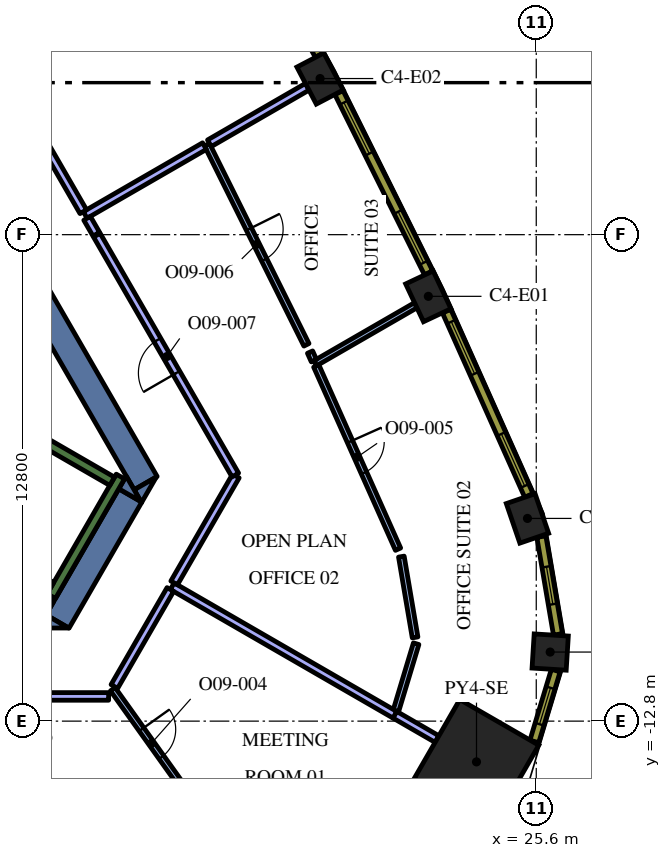
"""IFC4 building model, lengths in metres.
Left out: names, types, materials, properties, quantities, classifications, styles, units other than length and angle.
Written with IfcOpenShell. Run it as: python <this file> out.ifc"""

import sys

from ifc_helpers import new_model, si_unit, direction, frame, frame_2d, origin, origin_2d, place, context, subcontext, project, spatial, polyline, rectangle, outline, extrude, element, fill, save


model = new_model("IFC4")
c1 = context("Model", 3, precision=1e-05, world=origin(), true_north=direction((0.0, 1.0)))
c2 = subcontext(c1, "Body", "Model", "MODEL_VIEW")
j1 = project(units=[si_unit("LENGTHUNIT", "METRE"), si_unit("PLANEANGLEUNIT", "RADIAN")], contexts=[c1])
p1 = place(None, origin())
s1 = spatial("IfcSite", under=j1, at=p1, CompositionType="ELEMENT")
p2 = place(p1, origin())
s2 = spatial("IfcBuilding", under=s1, at=p2, CompositionType="ELEMENT")
p3 = place(p2, frame((0.0, 0.0, 243.6)))
s3 = spatial("IfcBuildingStorey", under=s2, at=p3, CompositionType="ELEMENT", Elevation=243.6)
p4 = place(p3, frame((24.027, -13.872, 0.0), z_axis=(0.0, 0.0, 1.0), x_axis=(0.866025403784, -0.5, 0.0)))
e1 = element("IfcColumn", 1, at=p4, inside=s3, PredefinedType="COLUMN", context=c2, shape_type="SweptSolid", body=[
    extrude(rectangle(XDim=2.4, YDim=2.4, at=origin_2d()), origin(), (0.0, 0.0, 1.0), 4.2),
])
p5 = place(p3, frame((25.967, -10.982, 0.0), z_axis=(0.0, 0.0, 1.0), x_axis=(0.062217428964, 0.998062619044, 0.0)))
e2 = element("IfcColumn", 2, at=p5, inside=s3, PredefinedType="COLUMN", context=c2, shape_type="SweptSolid", body=[
    extrude(rectangle(XDim=0.9, YDim=0.9, at=origin_2d()), origin(), (0.0, 0.0, 1.0), 4.2),
])
for number, where, z_axis, x_axis in (
    (3, (25.369, -7.466, 0.0), (0.0, 0.0, 1.0), (-0.324, 0.946, 0.0)),
    (4, (22.76, -1.623, 0.0), (0.0, 0.0, 1.0), (-0.426, 0.905, 0.0)),
    (5, (19.912, 4.108, 0.0), (0.0, 0.0, 1.0), (-0.464, 0.886, 0.0)),
):
    element("IfcColumn", number, at=place(p3, frame(where, z_axis=z_axis, x_axis=x_axis)), inside=s3, PredefinedType="COLUMN", context=c2, shape_type="SweptSolid", body=[
        extrude(rectangle(XDim=1.1, YDim=0.8, at=origin_2d()), origin(), (0.0, 0.0, 1.0), 4.2),
    ])
p6 = place(p3, frame((9.085, 4.264, 0.0), z_axis=(0.0, 0.0, 1.0), x_axis=(0.499998082512, -0.866026510844, 0.0)))
e6 = element("IfcWall", 6, at=p6, inside=s3, PredefinedType="SOLIDWALL", context=c2, shape_type="SweptSolid", body=[
    extrude(rectangle(XDim=12.472, YDim=0.7, at=frame_2d((6.236, 0.0))), origin(), (0.0, 0.0, 1.0), 4.2),
])
p7 = place(p3, origin())
e7 = element("IfcWall", 7, at=p7, inside=s3, PredefinedType="SOLIDWALL", context=c2, shape_type="SweptSolid", body=[
    extrude(outline(polyline([(15.213, -7.05), (15.019, -6.714), (15.601, -6.378), (15.213, -7.05)])), origin(), (0.0, 0.0, 1.0), 4.2),
])
p8 = place(p3, frame((13.003, -10.179, 0.0), z_axis=(0.0, 0.0, 1.0), x_axis=(0.499972675833, 0.866041178825, 0.0)))
e8 = element("IfcWall", 8, at=p8, inside=s3, PredefinedType="SOLIDWALL", context=c2, shape_type="SweptSolid", body=[
    extrude(rectangle(XDim=3.829, YDim=0.7, at=frame_2d((1.915, 0.0))), origin(), (0.0, 0.0, 1.0), 4.2),
])
e9 = element("IfcWall", 9, at=p7, inside=s3, PredefinedType="SOLIDWALL", context=c2, shape_type="SweptSolid", body=[
    extrude(outline(polyline([(12.5, -10.35), (12.698, -10.005), (13.296, -10.35), (12.5, -10.35)])), origin(), (0.0, 0.0, 1.0), 4.2),
])
e10 = element("IfcWall", 10, at=p7, inside=s3, PredefinedType="SOLIDWALL", context=c2, shape_type="SweptSolid", body=[
    extrude(outline(polyline([(14.809, -6.35), (15.197, -7.022), (14.615, -6.686), (14.809, -6.35)])), origin(), (0.0, 0.0, 1.0), 4.2),
])
e11 = element("IfcWall", 11, at=p7, inside=s3, PredefinedType="SOLIDWALL", context=c2, shape_type="SweptSolid", body=[
    extrude(outline(polyline([(12.904, -9.65), (12.516, -10.322), (12.516, -9.65), (12.904, -9.65)])), origin(), (0.0, 0.0, 1.0), 4.2),
])
p9 = place(p3, frame((12.84, -9.511, 0.0), z_axis=(0.0, 0.0, 1.0), x_axis=(0.500048121057, 0.865997619297, 0.0)))
e12 = element("IfcWall", 12, at=p9, inside=s3, PredefinedType="SOLIDWALL", context=c2, shape_type="SweptSolid", body=[
    extrude(rectangle(XDim=3.634, YDim=0.25, at=frame_2d((1.817, 0.0))), origin(), (0.0, 0.0, 1.0), 4.2),
])
p10 = place(p3, frame((12.84, -9.261, 0.0), z_axis=(0.0, 0.0, 1.0), x_axis=(-0.866013990052, 0.500019768644, 0.0)))
e13 = element("IfcWall", 13, at=p10, inside=s3, PredefinedType="SOLIDWALL", context=c2, shape_type="SweptSolid", body=[
    extrude(rectangle(XDim=6.8, YDim=0.25, at=frame_2d((3.4, 0.0))), origin(), (0.0, 0.0, 1.0), 4.2),
])
p11 = place(p3, frame((8.334, -2.964, 0.0), z_axis=(0.0, 0.0, 1.0), x_axis=(0.866016039709, -0.500016218704, 0.0)))
e14 = element("IfcWall", 14, at=p11, inside=s3, PredefinedType="SOLIDWALL", context=c2, shape_type="SweptSolid", body=[
    extrude(rectangle(XDim=7.05, YDim=0.25, at=frame_2d((3.525, 0.0))), origin(), (0.0, 0.0, 1.0), 4.2),
])
p12 = place(p3, frame((14.457, -11.96, 0.0), z_axis=(0.0, 0.0, 1.0), x_axis=(0.581049944662, -0.81386790194, 0.0)))
e15 = element("IfcWall", 15, at=p12, inside=s3, PredefinedType="PARTITIONING", context=c2, shape_type="SweptSolid", body=[
    extrude(rectangle(XDim=3.926, YDim=0.15, at=frame_2d((1.963, 0.0))), origin(), (0.0, 0.0, 1.0), 3.45),
])
p13 = place(p12, frame((1.3, 0.0, 0.0)))
e16 = element("IfcOpeningElement", 16, at=p13, cuts=e15, PredefinedType="OPENING", context=c2, shape_type="SweptSolid", body=[
    extrude(rectangle(XDim=0.9, YDim=2.1, at=frame_2d((0.45, 1.05))), frame((0.0, 0.085, 0.0), z_axis=(0.0, -1.0, 0.0), x_axis=(1.0, 0.0, 0.0)), (0.0, 0.0, 1.0), 0.17),
])
p14 = place(p3, frame((9.72, -12.15, 0.0), z_axis=(0.0, 0.0, 1.0), x_axis=(1.0, 0.0, 0.0)))
e17 = element("IfcWall", 17, at=p14, inside=s3, PredefinedType="PARTITIONING", context=c2, shape_type="SweptSolid", body=[
    extrude(rectangle(XDim=4.627, YDim=0.2, at=frame_2d((2.314, 0.0))), origin(), (0.0, 0.0, 1.0), 3.45),
])
p15 = place(p14, frame((1.8, 0.0, 0.0)))
e18 = element("IfcOpeningElement", 18, at=p15, cuts=e17, PredefinedType="OPENING", context=c2, shape_type="SweptSolid", body=[
    extrude(rectangle(XDim=1.0, YDim=2.1, at=frame_2d((0.5, 1.05))), frame((0.0, 0.11, 0.0), z_axis=(0.0, -1.0, 0.0), x_axis=(1.0, 0.0, 0.0)), (0.0, 0.0, 1.0), 0.22),
])
p16 = place(p3, frame((21.873, -12.628, 0.0), z_axis=(0.0, 0.0, 1.0), x_axis=(0.866052988967, -0.499952218018, 0.0)))
e19 = element("IfcWall", 19, at=p16, inside=s3, PredefinedType="PARTITIONING", context=c2, shape_type="SweptSolid", body=[
    extrude(rectangle(XDim=1.288, YDim=0.2, at=frame_2d((0.644, 0.0))), origin(), (0.0, 0.0, 1.0), 3.45),
])
p17 = place(p3, frame((16.021, -9.25, 0.0), z_axis=(0.0, 0.0, 1.0), x_axis=(0.86602692059, -0.499997372806, 0.0)))
e20 = element("IfcWall", 20, at=p17, inside=s3, PredefinedType="PARTITIONING", context=c2, shape_type="SweptSolid", body=[
    extrude(rectangle(XDim=6.765, YDim=0.2, at=frame_2d((3.382, 0.0))), origin(), (0.0, 0.0, 1.0), 3.45),
])
p18 = place(p3, frame((14.498, -11.888, 0.0), z_axis=(0.0, 0.0, 1.0), x_axis=(0.500006981563, 0.86602137294, 0.0)))
e21 = element("IfcWall", 21, at=p18, inside=s3, PredefinedType="PARTITIONING", context=c2, shape_type="SweptSolid", body=[
    extrude(rectangle(XDim=2.946, YDim=0.2, at=frame_2d((1.473, 0.0))), origin(), (0.0, 0.0, 1.0), 3.45),
])
p19 = place(p3, frame((19.78, -3.386, 0.0), z_axis=(0.0, 0.0, 1.0), x_axis=(0.866063280451, 0.49993438995, 0.0)))
e22 = element("IfcWall", 22, at=p19, inside=s3, PredefinedType="PARTITIONING", context=c2, shape_type="SweptSolid", body=[
    extrude(rectangle(XDim=3.058, YDim=0.15, at=frame_2d((1.529, 0.0))), origin(), (0.0, 0.0, 1.0), 3.45),
])
p20 = place(p3, frame((21.906, -12.532, 0.0), z_axis=(0.0, 0.0, 1.0), x_axis=(0.288789848591, 0.957392512688, 0.0)))
e23 = element("IfcWall", 23, at=p20, inside=s3, PredefinedType="PARTITIONING", context=c2, shape_type="SweptSolid", body=[
    extrude(rectangle(XDim=1.848, YDim=0.15, at=frame_2d((0.924, 0.0))), origin(), (0.0, 0.0, 1.0), 3.45),
])
p21 = place(p3, frame((22.412, -10.597, 0.0), z_axis=(0.0, 0.0, 1.0), x_axis=(-0.167612004459, 0.985853039738, 0.0)))
e24 = element("IfcWall", 24, at=p21, inside=s3, PredefinedType="PARTITIONING", context=c2, shape_type="SweptSolid", body=[
    extrude(rectangle(XDim=2.156, YDim=0.15, at=frame_2d((1.078, 0.0))), origin(), (0.0, 0.0, 1.0), 3.45),
])
p22 = place(p3, frame((19.811, -3.455, 0.0), z_axis=(0.0, 0.0, 1.0), x_axis=(0.407605393886, -0.913158169692, 0.0)))
e25 = element("IfcWall", 25, at=p22, inside=s3, PredefinedType="PARTITIONING", context=c2, shape_type="SweptSolid", body=[
    extrude(rectangle(XDim=5.279, YDim=0.15, at=frame_2d((2.64, 0.0))), origin(), (0.0, 0.0, 1.0), 3.45),
])
p23 = place(p22, frame((2.179, 0.0, 0.0)))
e26 = element("IfcOpeningElement", 26, at=p23, cuts=e25, PredefinedType="OPENING", context=c2, shape_type="SweptSolid", body=[
    extrude(rectangle(XDim=0.9, YDim=2.1, at=frame_2d((0.45, 1.05))), frame((0.0, 0.085, 0.0), z_axis=(0.0, -1.0, 0.0), x_axis=(1.0, 0.0, 0.0)), (0.0, 0.0, 1.0), 0.17),
])
p24 = place(p3, frame((19.75, -3.317, 0.0), z_axis=(0.0, 0.0, 1.0), x_axis=(-0.406774979688, 0.913528388119, 0.0)))
e27 = element("IfcWall", 27, at=p24, inside=s3, PredefinedType="PARTITIONING", context=c2, shape_type="SweptSolid", body=[
    extrude(rectangle(XDim=0.249, YDim=0.15, at=frame_2d((0.125, 0.0))), origin(), (0.0, 0.0, 1.0), 3.45),
])
p25 = place(p3, frame((16.935, 2.368, 0.0), z_axis=(0.0, 0.0, 1.0), x_axis=(0.445153322039, -0.895454365045, 0.0)))
e28 = element("IfcWall", 28, at=p25, inside=s3, PredefinedType="PARTITIONING", context=c2, shape_type="SweptSolid", body=[
    extrude(rectangle(XDim=5.881, YDim=0.15, at=frame_2d((2.94, 0.0))), origin(), (0.0, 0.0, 1.0), 3.45),
])
p26 = place(p25, frame((2.481, 0.0, 0.0)))
e29 = element("IfcOpeningElement", 29, at=p26, cuts=e28, PredefinedType="OPENING", context=c2, shape_type="SweptSolid", body=[
    extrude(rectangle(XDim=0.9, YDim=2.1, at=frame_2d((0.45, 1.05))), frame((0.0, 0.085, 0.0), z_axis=(0.0, -1.0, 0.0), x_axis=(1.0, 0.0, 0.0)), (0.0, 0.0, 1.0), 0.17),
])
p27 = place(p3, frame((17.0, 2.406, 0.0), z_axis=(0.0, 0.0, 1.0), x_axis=(0.86605561342, 0.499947671726, 0.0)))
e30 = element("IfcWall", 30, at=p27, inside=s3, PredefinedType="PARTITIONING", context=c2, shape_type="SweptSolid", body=[
    extrude(rectangle(XDim=2.971, YDim=0.2, at=frame_2d((1.486, 0.0))), origin(), (0.0, 0.0, 1.0), 3.45),
])
p28 = place(p3, frame((13.731, 0.518, 0.0), z_axis=(0.0, 0.0, 1.0), x_axis=(0.8660128559, 0.500021732944, 0.0)))
e31 = element("IfcWall", 31, at=p28, inside=s3, PredefinedType="PARTITIONING", context=c2, shape_type="SweptSolid", body=[
    extrude(rectangle(XDim=3.625, YDim=0.2, at=frame_2d((1.812, 0.0))), origin(), (0.0, 0.0, 1.0), 3.45),
])
p29 = place(p3, frame((14.022, 0.013, 0.0), z_axis=(0.0, 0.0, 1.0), x_axis=(-0.500159754115, 0.865933150054, 0.0)))
e32 = element("IfcWall", 32, at=p29, inside=s3, PredefinedType="PARTITIONING", context=c2, shape_type="SweptSolid", body=[
    extrude(rectangle(XDim=0.483, YDim=0.2, at=frame_2d((0.242, 0.0))), origin(), (0.0, 0.0, 1.0), 3.45),
])
p30 = place(p3, frame((16.072, -9.163, 0.0), z_axis=(0.0, 0.0, 1.0), x_axis=(0.500010870188, 0.866019127788, 0.0)))
e33 = element("IfcWall", 33, at=p30, inside=s3, PredefinedType="PARTITIONING", context=c2, shape_type="SweptSolid", body=[
    extrude(rectangle(XDim=3.249, YDim=0.2, at=frame_2d((1.624, 0.0))), origin(), (0.0, 0.0, 1.0), 3.45),
])
p31 = place(p3, frame((17.681, -6.324, 0.0), z_axis=(0.0, 0.0, 1.0), x_axis=(-0.50002695829, 0.866009838849, 0.0)))
e34 = element("IfcWall", 34, at=p31, inside=s3, PredefinedType="PARTITIONING", context=c2, shape_type="SweptSolid", body=[
    extrude(rectangle(XDim=7.287, YDim=0.2, at=frame_2d((3.644, 0.0))), origin(), (0.0, 0.0, 1.0), 3.45),
])
p32 = place(p31, frame((3.1, 0.0, 0.0)))
e35 = element("IfcOpeningElement", 35, at=p32, cuts=e34, PredefinedType="OPENING", context=c2, shape_type="SweptSolid", body=[
    extrude(rectangle(XDim=1.0, YDim=2.1, at=frame_2d((0.5, 1.05))), frame((0.0, 0.11, 0.0), z_axis=(0.0, -1.0, 0.0), x_axis=(1.0, 0.0, 0.0)), (0.0, 0.0, 1.0), 0.22),
])
p33 = place(p3, frame((13.681, 0.604, 0.0), z_axis=(0.0, 0.0, 1.0), x_axis=(-0.500001759768, 0.86602438778, 0.0)))
e36 = element("IfcWall", 36, at=p33, inside=s3, PredefinedType="PARTITIONING", context=c2, shape_type="SweptSolid", body=[
    extrude(rectangle(XDim=13.317, YDim=0.2, at=frame_2d((6.658, 0.0))), origin(), (0.0, 0.0, 1.0), 3.45),
])
p34 = place(p33, frame((6.2, 0.0, 0.0)))
e37 = element("IfcOpeningElement", 37, at=p34, cuts=e36, PredefinedType="OPENING", context=c2, shape_type="SweptSolid", body=[
    extrude(rectangle(XDim=1.0, YDim=2.1, at=frame_2d((0.5, 1.05))), frame((0.0, 0.11, 0.0), z_axis=(0.0, -1.0, 0.0), x_axis=(1.0, 0.0, 0.0)), (0.0, 0.0, 1.0), 0.22),
])
p35 = place(p3, frame((25.55, -13.335, 0.0), z_axis=(0.0, 0.0, 1.0), x_axis=(0.288727209095, 0.957411405159, 0.0)))
e38 = element("IfcWall", 38, at=p35, inside=s3, PredefinedType="SOLIDWALL", context=c2, shape_type="SweptSolid", body=[
    extrude(rectangle(XDim=1.948, YDim=0.24, at=frame_2d((0.974, 0.0))), origin(), (0.0, 0.0, 1.0), 3.95),
])
p36 = place(p35, frame((0.474, 0.0, 0.9)))
e39 = element("IfcOpeningElement", 39, at=p36, cuts=e38, PredefinedType="OPENING", context=c2, shape_type="SweptSolid", body=[
    extrude(rectangle(XDim=1.0, YDim=2.55, at=frame_2d((0.5, 1.275))), frame((0.0, 0.13, 0.0), z_axis=(0.0, -1.0, 0.0), x_axis=(1.0, 0.0, 0.0)), (0.0, 0.0, 1.0), 0.26),
])
p37 = place(p3, frame((26.172, -10.517, 0.0), z_axis=(0.0, 0.0, 1.0), x_axis=(-0.167660055546, 0.985844869021, 0.0)))
e40 = element("IfcWall", 40, at=p37, inside=s3, PredefinedType="SOLIDWALL", context=c2, shape_type="SweptSolid", body=[
    extrude(rectangle(XDim=2.609, YDim=0.24, at=frame_2d((1.305, 0.0))), origin(), (0.0, 0.0, 1.0), 3.95),
])
p38 = place(p37, frame((0.805, 0.0, 0.9)))
e41 = element("IfcOpeningElement", 41, at=p38, cuts=e40, PredefinedType="OPENING", context=c2, shape_type="SweptSolid", body=[
    extrude(rectangle(XDim=1.0, YDim=2.55, at=frame_2d((0.5, 1.275))), frame((0.0, 0.13, 0.0), z_axis=(0.0, -1.0, 0.0), x_axis=(1.0, 0.0, 0.0)), (0.0, 0.0, 1.0), 0.26),
])
p39 = place(p3, frame((25.405, -6.861, 0.0), z_axis=(0.0, 0.0, 1.0), x_axis=(-0.407579651789, 0.913169659728, 0.0)))
e42 = element("IfcWall", 42, at=p39, inside=s3, PredefinedType="SOLIDWALL", context=c2, shape_type="SweptSolid", body=[
    extrude(rectangle(XDim=5.311, YDim=0.24, at=frame_2d((2.655, 0.0))), origin(), (0.0, 0.0, 1.0), 3.95),
])
p40 = place(p39, frame((0.271, 0.0, 0.9)))
e43 = element("IfcOpeningElement", 43, at=p40, cuts=e42, PredefinedType="OPENING", context=c2, shape_type="SweptSolid", body=[
    extrude(rectangle(XDim=1.5, YDim=2.55, at=frame_2d((0.75, 1.275))), frame((0.0, 0.13, 0.0), z_axis=(0.0, -1.0, 0.0), x_axis=(1.0, 0.0, 0.0)), (0.0, 0.0, 1.0), 0.26),
])
p41 = place(p39, frame((3.504, 0.0, 0.9)))
e44 = element("IfcOpeningElement", 44, at=p41, cuts=e42, PredefinedType="OPENING", context=c2, shape_type="SweptSolid", body=[
    extrude(rectangle(XDim=1.5, YDim=2.55, at=frame_2d((0.75, 1.275))), frame((0.0, 0.13, 0.0), z_axis=(0.0, -1.0, 0.0), x_axis=(1.0, 0.0, 0.0)), (0.0, 0.0, 1.0), 0.26),
])
p42 = place(p3, frame((22.766, -1.005, 0.0), z_axis=(0.0, 0.0, 1.0), x_axis=(-0.445129582031, 0.895466166419, 0.0)))
e45 = element("IfcWall", 45, at=p42, inside=s3, PredefinedType="SOLIDWALL", context=c2, shape_type="SweptSolid", body=[
    extrude(rectangle(XDim=5.298, YDim=0.24, at=frame_2d((2.649, 0.0))), origin(), (0.0, 0.0, 1.0), 3.95),
])
p43 = place(p42, frame((0.295, 0.0, 0.9)))
e46 = element("IfcOpeningElement", 46, at=p43, cuts=e45, PredefinedType="OPENING", context=c2, shape_type="SweptSolid", body=[
    extrude(rectangle(XDim=1.5, YDim=2.55, at=frame_2d((0.75, 1.275))), frame((0.0, 0.13, 0.0), z_axis=(0.0, -1.0, 0.0), x_axis=(1.0, 0.0, 0.0)), (0.0, 0.0, 1.0), 0.26),
])
p44 = place(p42, frame((3.504, 0.0, 0.9)))
e47 = element("IfcOpeningElement", 47, at=p44, cuts=e45, PredefinedType="OPENING", context=c2, shape_type="SweptSolid", body=[
    extrude(rectangle(XDim=1.5, YDim=2.55, at=frame_2d((0.75, 1.275))), frame((0.0, 0.13, 0.0), z_axis=(0.0, -1.0, 0.0), x_axis=(1.0, 0.0, 0.0)), (0.0, 0.0, 1.0), 0.26),
])
p45 = place(p3, frame((19.892, 4.725, 0.0), z_axis=(0.0, 0.0, 1.0), x_axis=(-0.481925825015, 0.876212017256, 0.0)))
e48 = element("IfcWall", 48, at=p45, inside=s3, PredefinedType="SOLIDWALL", context=c2, shape_type="SweptSolid", body=[
    extrude(rectangle(XDim=5.299, YDim=0.24, at=frame_2d((2.649, 0.0))), origin(), (0.0, 0.0, 1.0), 3.95),
])
p46 = place(p45, frame((0.295, 0.0, 0.9)))
e49 = element("IfcOpeningElement", 49, at=p46, cuts=e48, PredefinedType="OPENING", context=c2, shape_type="SweptSolid", body=[
    extrude(rectangle(XDim=1.5, YDim=2.55, at=frame_2d((0.75, 1.275))), frame((0.0, 0.13, 0.0), z_axis=(0.0, -1.0, 0.0), x_axis=(1.0, 0.0, 0.0)), (0.0, 0.0, 1.0), 0.26),
])
p47 = place(p45, frame((3.504, 0.0, 0.9)))
e50 = element("IfcOpeningElement", 50, at=p47, cuts=e48, PredefinedType="OPENING", context=c2, shape_type="SweptSolid", body=[
    extrude(rectangle(XDim=1.5, YDim=2.55, at=frame_2d((0.75, 1.275))), frame((0.0, 0.13, 0.0), z_axis=(0.0, -1.0, 0.0), x_axis=(1.0, 0.0, 0.0)), (0.0, 0.0, 1.0), 0.26),
])
p48 = place(p13, origin())
e51 = element("IfcDoor", 51, at=p48, inside=s3, OperationType="SINGLE_SWING_LEFT", PredefinedType="DOOR", context=c2, shape_type="SweptSolid", body=[
    extrude(rectangle(XDim=0.9, YDim=2.1, at=frame_2d((0.45, 1.05))), frame((0.0, 0.025, 0.0), z_axis=(0.0, -1.0, 0.0), x_axis=(1.0, 0.0, 0.0)), (0.0, 0.0, 1.0), 0.05),
])
fill(e16, e51)
p49 = place(p23, origin())
e52 = element("IfcDoor", 52, at=p49, inside=s3, OperationType="SINGLE_SWING_LEFT", PredefinedType="DOOR", context=c2, shape_type="SweptSolid", body=[
    extrude(rectangle(XDim=0.9, YDim=2.1, at=frame_2d((0.45, 1.05))), frame((0.0, 0.025, 0.0), z_axis=(0.0, -1.0, 0.0), x_axis=(1.0, 0.0, 0.0)), (0.0, 0.0, 1.0), 0.05),
])
fill(e26, e52)
p50 = place(p26, origin())
e53 = element("IfcDoor", 53, at=p50, inside=s3, OperationType="SINGLE_SWING_LEFT", PredefinedType="DOOR", context=c2, shape_type="SweptSolid", body=[
    extrude(rectangle(XDim=0.9, YDim=2.1, at=frame_2d((0.45, 1.05))), frame((0.0, 0.025, 0.0), z_axis=(0.0, -1.0, 0.0), x_axis=(1.0, 0.0, 0.0)), (0.0, 0.0, 1.0), 0.05),
])
fill(e29, e53)
p51 = place(p32, origin())
e54 = element("IfcDoor", 54, at=p51, inside=s3, OperationType="SINGLE_SWING_LEFT", PredefinedType="DOOR", context=c2, shape_type="SweptSolid", body=[
    extrude(rectangle(XDim=1.0, YDim=2.1, at=frame_2d((0.5, 1.05))), frame((0.0, 0.025, 0.0), z_axis=(0.0, -1.0, 0.0), x_axis=(1.0, 0.0, 0.0)), (0.0, 0.0, 1.0), 0.05),
])
fill(e35, e54)
p52 = place(p36, origin())
e55 = element("IfcWindow", 55, at=p52, inside=s3, PartitioningType="SINGLE_PANEL", PredefinedType="WINDOW", context=c2, shape_type="SweptSolid", body=[
    extrude(rectangle(XDim=1.0, YDim=2.55, at=frame_2d((0.5, 1.275))), frame((0.0, 0.04, 0.0), z_axis=(0.0, -1.0, 0.0), x_axis=(1.0, 0.0, 0.0)), (0.0, 0.0, 1.0), 0.06),
])
fill(e39, e55)
p53 = place(p38, origin())
e56 = element("IfcWindow", 56, at=p53, inside=s3, PartitioningType="SINGLE_PANEL", PredefinedType="WINDOW", context=c2, shape_type="SweptSolid", body=[
    extrude(rectangle(XDim=1.0, YDim=2.55, at=frame_2d((0.5, 1.275))), frame((0.0, 0.04, 0.0), z_axis=(0.0, -1.0, 0.0), x_axis=(1.0, 0.0, 0.0)), (0.0, 0.0, 1.0), 0.06),
])
fill(e41, e56)
p54 = place(p40, origin())
e57 = element("IfcWindow", 57, at=p54, inside=s3, PartitioningType="SINGLE_PANEL", PredefinedType="WINDOW", context=c2, shape_type="SweptSolid", body=[
    extrude(rectangle(XDim=1.5, YDim=2.55, at=frame_2d((0.75, 1.275))), frame((0.0, 0.04, 0.0), z_axis=(0.0, -1.0, 0.0), x_axis=(1.0, 0.0, 0.0)), (0.0, 0.0, 1.0), 0.06),
])
fill(e43, e57)
p55 = place(p41, origin())
e58 = element("IfcWindow", 58, at=p55, inside=s3, PartitioningType="SINGLE_PANEL", PredefinedType="WINDOW", context=c2, shape_type="SweptSolid", body=[
    extrude(rectangle(XDim=1.5, YDim=2.55, at=frame_2d((0.75, 1.275))), frame((0.0, 0.04, 0.0), z_axis=(0.0, -1.0, 0.0), x_axis=(1.0, 0.0, 0.0)), (0.0, 0.0, 1.0), 0.06),
])
fill(e44, e58)
p56 = place(p43, origin())
e59 = element("IfcWindow", 59, at=p56, inside=s3, PartitioningType="SINGLE_PANEL", PredefinedType="WINDOW", context=c2, shape_type="SweptSolid", body=[
    extrude(rectangle(XDim=1.5, YDim=2.55, at=frame_2d((0.75, 1.275))), frame((0.0, 0.04, 0.0), z_axis=(0.0, -1.0, 0.0), x_axis=(1.0, 0.0, 0.0)), (0.0, 0.0, 1.0), 0.06),
])
fill(e46, e59)
p57 = place(p44, origin())
e60 = element("IfcWindow", 60, at=p57, inside=s3, PartitioningType="SINGLE_PANEL", PredefinedType="WINDOW", context=c2, shape_type="SweptSolid", body=[
    extrude(rectangle(XDim=1.5, YDim=2.55, at=frame_2d((0.75, 1.275))), frame((0.0, 0.04, 0.0), z_axis=(0.0, -1.0, 0.0), x_axis=(1.0, 0.0, 0.0)), (0.0, 0.0, 1.0), 0.06),
])
fill(e47, e60)
save(model, sys.argv[1])
